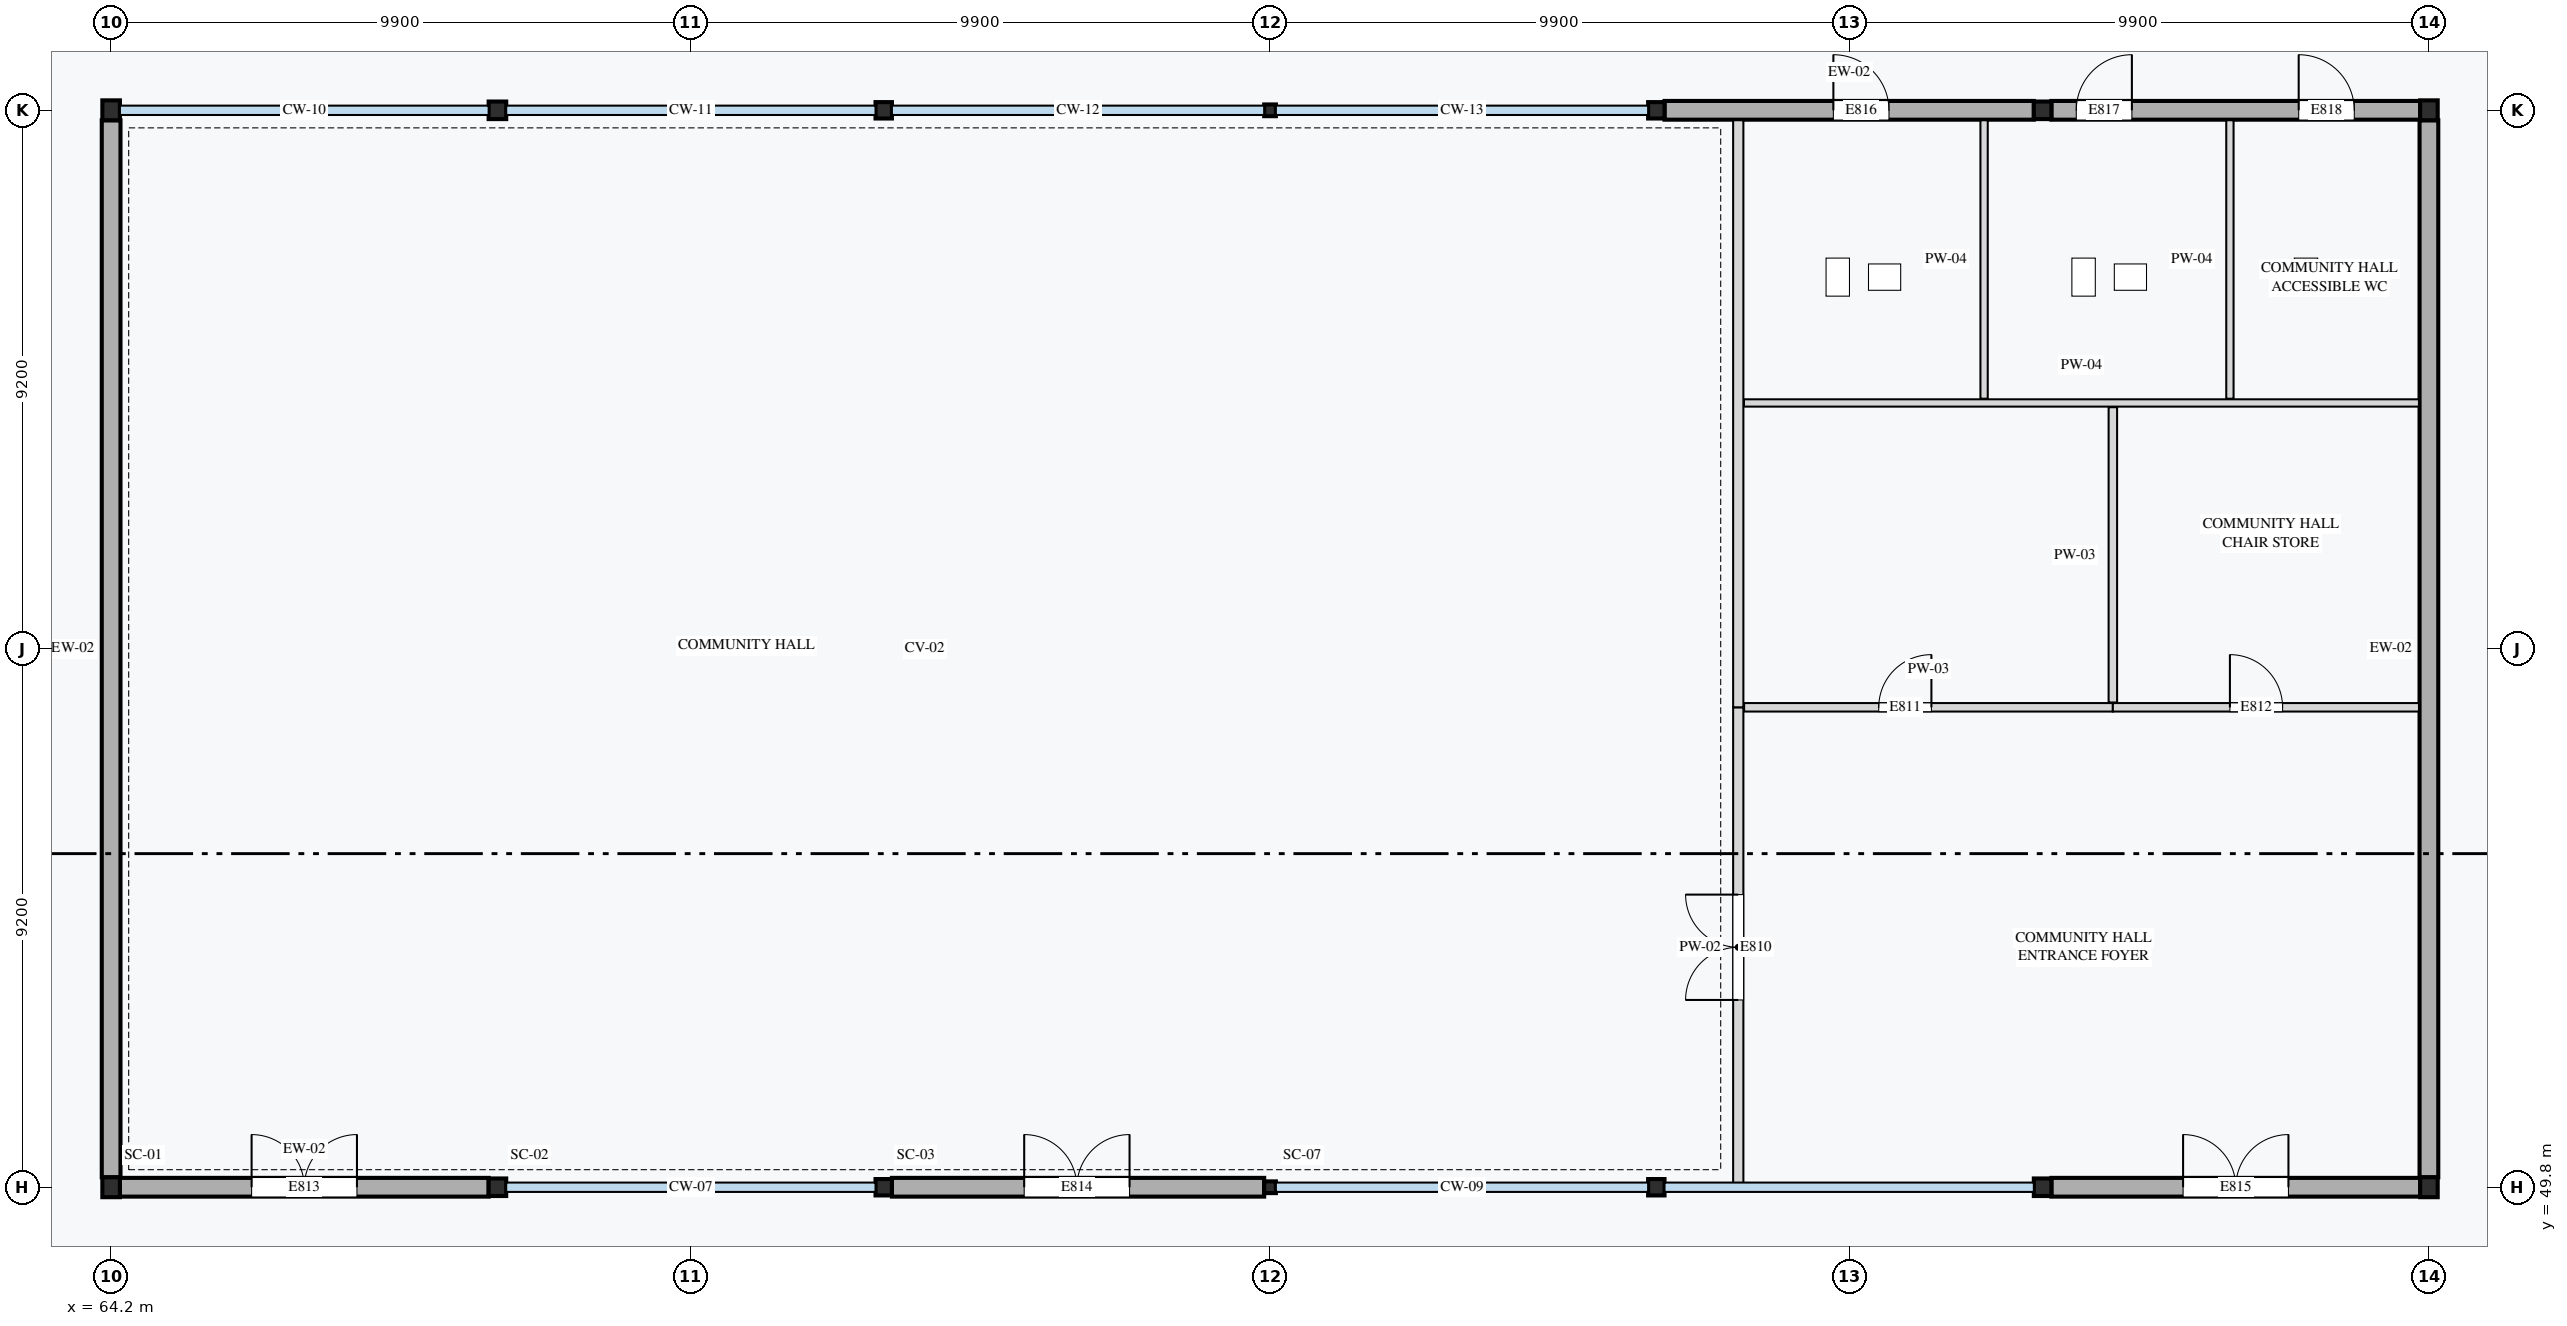
"""IFC4 building model, lengths in metres.
Left out: names, types, materials, properties, quantities, classifications, styles, units other than length and angle.
Written with IfcOpenShell. Run it as: python <this file> out.ifc"""

import sys

from ifc_helpers import new_model, si_unit, direction, frame, frame_2d, origin, origin_2d, place, context, subcontext, project, spatial, rectangle, hollow_rectangle, i_section, extrude, element, fill, save


model = new_model("IFC4")
c1 = context("Model", 3, precision=1e-05, world=origin(), true_north=direction((0.0, 1.0)))
c2 = subcontext(c1, "Body", "Model", "MODEL_VIEW")
j1 = project(units=[si_unit("LENGTHUNIT", "METRE"), si_unit("PLANEANGLEUNIT", "RADIAN")], contexts=[c1])
p1 = place(None, origin())
s1 = spatial("IfcSite", under=j1, at=p1, CompositionType="ELEMENT")
p2 = place(p1, origin())
s2 = spatial("IfcBuilding", under=s1, at=p2, CompositionType="ELEMENT")
p3 = place(p2, frame((0.0, 0.0, 4.2)))
s3 = spatial("IfcBuildingStorey", under=s2, at=p3, CompositionType="ELEMENT", Elevation=4.2)
for number, where, z_axis, x_axis in (
    (1, (64.2, 49.8, 0.0), (0.0, 0.0, 1.0), (1.0, 0.0, 0.0)),
    (2, (64.2, 68.2, 0.0), (0.0, 0.0, 1.0), (1.0, 0.0, 0.0)),
):
    element("IfcColumn", number, at=place(p3, frame(where, z_axis=z_axis, x_axis=x_axis)), inside=s3, PredefinedType="COLUMN", context=c2, shape_type="SweptSolid", body=[
        extrude(i_section(OverallWidth=0.3, OverallDepth=0.34, WebThickness=0.012, FlangeThickness=0.021, FilletRadius=0.027, at=origin_2d()), origin(), (0.0, 0.0, 1.0), 3.96),
    ])
for number, where, z_axis, x_axis in (
    (3, (70.8, 49.8, 0.0), (0.0, 0.0, 1.0), (1.0, 0.0, 0.0)),
    (4, (70.8, 68.2, 0.0), (0.0, 0.0, 1.0), (1.0, 0.0, 0.0)),
):
    element("IfcColumn", number, at=place(p3, frame(where, z_axis=z_axis, x_axis=x_axis)), inside=s3, PredefinedType="COLUMN", context=c2, shape_type="SweptSolid", body=[
        extrude(i_section(OverallWidth=0.3, OverallDepth=0.3, WebThickness=0.011, FlangeThickness=0.019, FilletRadius=0.027, at=origin_2d()), origin(), (0.0, 0.0, 1.0), 3.96),
    ])
for number, where, z_axis, x_axis in (
    (5, (77.4, 49.8, 0.0), (0.0, 0.0, 1.0), (1.0, 0.0, 0.0)),
    (6, (77.4, 68.2, 0.0), (0.0, 0.0, 1.0), (1.0, 0.0, 0.0)),
):
    element("IfcColumn", number, at=place(p3, frame(where, z_axis=z_axis, x_axis=x_axis)), inside=s3, PredefinedType="COLUMN", context=c2, shape_type="SweptSolid", body=[
        extrude(i_section(OverallWidth=0.28, OverallDepth=0.28, WebThickness=0.01, FlangeThickness=0.018, FilletRadius=0.024, at=origin_2d()), origin(), (0.0, 0.0, 1.0), 3.96),
    ])
for number, where, z_axis, x_axis in (
    (7, (84.0, 49.8, 0.0), (0.0, 0.0, 1.0), (1.0, 0.0, 0.0)),
    (8, (84.0, 68.2, 0.0), (0.0, 0.0, 1.0), (1.0, 0.0, 0.0)),
):
    element("IfcColumn", number, at=place(p3, frame(where, z_axis=z_axis, x_axis=x_axis)), inside=s3, PredefinedType="COLUMN", context=c2, shape_type="SweptSolid", body=[
        extrude(hollow_rectangle(XDim=0.2, YDim=0.2, WallThickness=0.01, InnerFilletRadius=0.01, OuterFilletRadius=0.015, at=origin_2d()), origin(), (0.0, 0.0, 1.0), 3.96),
    ])
for number, where, z_axis, x_axis in (
    (9, (90.6, 49.8, 0.0), (0.0, 0.0, 1.0), (1.0, 0.0, 0.0)),
    (10, (90.6, 68.2, 0.0), (0.0, 0.0, 1.0), (1.0, 0.0, 0.0)),
):
    element("IfcColumn", number, at=place(p3, frame(where, z_axis=z_axis, x_axis=x_axis)), inside=s3, PredefinedType="COLUMN", context=c2, shape_type="SweptSolid", body=[
        extrude(i_section(OverallWidth=0.28, OverallDepth=0.28, WebThickness=0.01, FlangeThickness=0.018, FilletRadius=0.024, at=origin_2d()), origin(), (0.0, 0.0, 1.0), 3.96),
    ])
for number, where, z_axis, x_axis in (
    (11, (97.2, 49.8, 0.0), (0.0, 0.0, 1.0), (1.0, 0.0, 0.0)),
    (12, (97.2, 68.2, 0.0), (0.0, 0.0, 1.0), (1.0, 0.0, 0.0)),
):
    element("IfcColumn", number, at=place(p3, frame(where, z_axis=z_axis, x_axis=x_axis)), inside=s3, PredefinedType="COLUMN", context=c2, shape_type="SweptSolid", body=[
        extrude(i_section(OverallWidth=0.3, OverallDepth=0.3, WebThickness=0.011, FlangeThickness=0.019, FilletRadius=0.027, at=origin_2d()), origin(), (0.0, 0.0, 1.0), 3.96),
    ])
for number, where, z_axis, x_axis in (
    (13, (103.8, 49.8, 0.0), (0.0, 0.0, 1.0), (1.0, 0.0, 0.0)),
    (14, (103.8, 68.2, 0.0), (0.0, 0.0, 1.0), (1.0, 0.0, 0.0)),
):
    element("IfcColumn", number, at=place(p3, frame(where, z_axis=z_axis, x_axis=x_axis)), inside=s3, PredefinedType="COLUMN", context=c2, shape_type="SweptSolid", body=[
        extrude(i_section(OverallWidth=0.3, OverallDepth=0.34, WebThickness=0.012, FlangeThickness=0.021, FilletRadius=0.027, at=origin_2d()), origin(), (0.0, 0.0, 1.0), 3.96),
    ])
p4 = place(p3, frame((64.35, 49.8, 0.0), z_axis=(0.0, 0.0, 1.0), x_axis=(1.0, 0.0, 0.0)))
e15 = element("IfcWall", 15, at=p4, inside=s3, PredefinedType="STANDARD", context=c2, shape_type="SweptSolid", body=[
    extrude(rectangle(XDim=6.3, YDim=0.32, at=frame_2d((3.15, 0.0))), origin(), (0.0, 0.0, 1.0), 3.55),
])
p5 = place(p4, frame((2.25, 0.0, 0.0)))
e16 = element("IfcOpeningElement", 16, at=p5, cuts=e15, PredefinedType="OPENING", context=c2, shape_type="SweptSolid", body=[
    extrude(rectangle(XDim=1.8, YDim=2.4, at=frame_2d((0.9, 1.2))), frame((0.0, 0.17, 0.0), z_axis=(0.0, -1.0, 0.0), x_axis=(1.0, 0.0, 0.0)), (0.0, 0.0, 1.0), 0.34),
])
p6 = place(p3, frame((77.54, 49.8, 0.0), z_axis=(0.0, 0.0, 1.0), x_axis=(1.0, 0.0, 0.0)))
e17 = element("IfcWall", 17, at=p6, inside=s3, PredefinedType="STANDARD", context=c2, shape_type="SweptSolid", body=[
    extrude(rectangle(XDim=6.36, YDim=0.32, at=frame_2d((3.18, 0.0))), origin(), (0.0, 0.0, 1.0), 3.55),
])
p7 = place(p6, frame((2.26, 0.0, 0.0)))
e18 = element("IfcOpeningElement", 18, at=p7, cuts=e17, PredefinedType="OPENING", context=c2, shape_type="SweptSolid", body=[
    extrude(rectangle(XDim=1.8, YDim=2.4, at=frame_2d((0.9, 1.2))), frame((0.0, 0.17, 0.0), z_axis=(0.0, -1.0, 0.0), x_axis=(1.0, 0.0, 0.0)), (0.0, 0.0, 1.0), 0.34),
])
p8 = place(p3, frame((90.74, 68.2, 0.0), z_axis=(0.0, 0.0, 1.0), x_axis=(1.0, 0.0, 0.0)))
e19 = element("IfcWall", 19, at=p8, inside=s3, PredefinedType="STANDARD", context=c2, shape_type="SweptSolid", body=[
    extrude(rectangle(XDim=6.31, YDim=0.32, at=frame_2d((3.155, 0.0))), origin(), (0.0, 0.0, 1.0), 3.55),
])
p9 = place(p8, frame((2.885, 0.0, 0.0)))
e20 = element("IfcOpeningElement", 20, at=p9, cuts=e19, PredefinedType="OPENING", context=c2, shape_type="SweptSolid", body=[
    extrude(rectangle(XDim=0.95, YDim=2.3, at=frame_2d((0.475, 1.15))), frame((0.0, 0.17, 0.0), z_axis=(0.0, -1.0, 0.0), x_axis=(1.0, 0.0, 0.0)), (0.0, 0.0, 1.0), 0.34),
])
p10 = place(p3, frame((97.35, 49.8, 0.0), z_axis=(0.0, 0.0, 1.0), x_axis=(1.0, 0.0, 0.0)))
e21 = element("IfcWall", 21, at=p10, inside=s3, PredefinedType="STANDARD", context=c2, shape_type="SweptSolid", body=[
    extrude(rectangle(XDim=6.3, YDim=0.32, at=frame_2d((3.15, 0.0))), origin(), (0.0, 0.0, 1.0), 3.55),
])
p11 = place(p10, frame((2.25, 0.0, 0.0)))
e22 = element("IfcOpeningElement", 22, at=p11, cuts=e21, PredefinedType="OPENING", context=c2, shape_type="SweptSolid", body=[
    extrude(rectangle(XDim=1.8, YDim=2.4, at=frame_2d((0.9, 1.2))), frame((0.0, 0.17, 0.0), z_axis=(0.0, -1.0, 0.0), x_axis=(1.0, 0.0, 0.0)), (0.0, 0.0, 1.0), 0.34),
])
p12 = place(p3, frame((97.35, 68.2, 0.0), z_axis=(0.0, 0.0, 1.0), x_axis=(1.0, 0.0, 0.0)))
e23 = element("IfcWall", 23, at=p12, inside=s3, PredefinedType="STANDARD", context=c2, shape_type="SweptSolid", body=[
    extrude(rectangle(XDim=6.3, YDim=0.32, at=frame_2d((3.15, 0.0))), origin(), (0.0, 0.0, 1.0), 3.55),
])
p13 = place(p12, frame((0.425, 0.0, 0.0)))
e24 = element("IfcOpeningElement", 24, at=p13, cuts=e23, PredefinedType="OPENING", context=c2, shape_type="SweptSolid", body=[
    extrude(rectangle(XDim=0.95, YDim=2.3, at=frame_2d((0.475, 1.15))), frame((0.0, 0.17, 0.0), z_axis=(0.0, -1.0, 0.0), x_axis=(1.0, 0.0, 0.0)), (0.0, 0.0, 1.0), 0.34),
])
p14 = place(p12, frame((4.225, 0.0, 0.0)))
e25 = element("IfcOpeningElement", 25, at=p14, cuts=e23, PredefinedType="OPENING", context=c2, shape_type="SweptSolid", body=[
    extrude(rectangle(XDim=0.95, YDim=2.3, at=frame_2d((0.475, 1.15))), frame((0.0, 0.17, 0.0), z_axis=(0.0, -1.0, 0.0), x_axis=(1.0, 0.0, 0.0)), (0.0, 0.0, 1.0), 0.34),
])
for number, where, z_axis, x_axis in (
    (26, (64.2, 49.97, 0.0), (0.0, 0.0, 1.0), (0.0, 1.0, 0.0)),
    (27, (103.8, 49.97, 0.0), (0.0, 0.0, 1.0), (0.0, 1.0, 0.0)),
):
    element("IfcWall", number, at=place(p3, frame(where, z_axis=z_axis, x_axis=x_axis)), inside=s3, PredefinedType="STANDARD", context=c2, shape_type="SweptSolid", body=[
        extrude(rectangle(XDim=18.06, YDim=0.32, at=frame_2d((9.03, 0.0))), origin(), (0.0, 0.0, 1.0), 2.6),
    ])
p15 = place(p3, frame((92.0, 49.8, 0.0), z_axis=(0.0, 0.0, 1.0), x_axis=(0.0, 1.0, 0.0)))
e28 = element("IfcWall", 28, at=p15, inside=s3, PredefinedType="PARTITIONING", context=c2, shape_type="SweptSolid", body=[
    extrude(rectangle(XDim=8.2, YDim=0.175, at=frame_2d((4.1, 0.0))), origin(), (0.0, 0.0, 1.0), 2.6),
])
p16 = place(p15, frame((3.2, 0.0, 0.0)))
e29 = element("IfcOpeningElement", 29, at=p16, cuts=e28, PredefinedType="OPENING", context=c2, shape_type="SweptSolid", body=[
    extrude(rectangle(XDim=1.8, YDim=2.26, at=frame_2d((0.9, 1.13))), frame((0.0, 0.097, 0.0), z_axis=(0.0, -1.0, 0.0), x_axis=(1.0, 0.0, 0.0)), (0.0, 0.0, 1.0), 0.195),
])
p17 = place(p3, frame((92.0, 58.0, 0.0), z_axis=(0.0, 0.0, 1.0), x_axis=(0.0, 1.0, 0.0)))
e30 = element("IfcWall", 30, at=p17, inside=s3, PredefinedType="PARTITIONING", context=c2, shape_type="SweptSolid", body=[
    extrude(rectangle(XDim=10.03, YDim=0.175, at=frame_2d((5.015, 0.0))), origin(), (0.0, 0.0, 1.0), 2.6),
])
p18 = place(p3, frame((92.1, 58.0, 0.0), z_axis=(0.0, 0.0, 1.0), x_axis=(1.0, 0.0, 0.0)))
e31 = element("IfcWall", 31, at=p18, inside=s3, PredefinedType="PARTITIONING", context=c2, shape_type="SweptSolid", body=[
    extrude(rectangle(XDim=6.3, YDim=0.145, at=frame_2d((3.15, 0.0))), origin(), (0.0, 0.0, 1.0), 2.6),
])
p19 = place(p18, frame((2.3, 0.0, 0.0)))
e32 = element("IfcOpeningElement", 32, at=p19, cuts=e31, PredefinedType="OPENING", context=c2, shape_type="SweptSolid", body=[
    extrude(rectangle(XDim=0.9, YDim=2.1, at=frame_2d((0.45, 1.05))), frame((0.0, 0.083, 0.0), z_axis=(0.0, -1.0, 0.0), x_axis=(1.0, 0.0, 0.0)), (0.0, 0.0, 1.0), 0.165),
])
p20 = place(p3, frame((98.4, 58.0, 0.0), z_axis=(0.0, 0.0, 1.0), x_axis=(1.0, 0.0, 0.0)))
e33 = element("IfcWall", 33, at=p20, inside=s3, PredefinedType="PARTITIONING", context=c2, shape_type="SweptSolid", body=[
    extrude(rectangle(XDim=5.23, YDim=0.145, at=frame_2d((2.615, 0.0))), origin(), (0.0, 0.0, 1.0), 2.6),
])
p21 = place(p20, frame((2.0, 0.0, 0.0)))
e34 = element("IfcOpeningElement", 34, at=p21, cuts=e33, PredefinedType="OPENING", context=c2, shape_type="SweptSolid", body=[
    extrude(rectangle(XDim=0.9, YDim=2.16, at=frame_2d((0.45, 1.08))), frame((0.0, 0.083, 0.0), z_axis=(0.0, -1.0, 0.0), x_axis=(1.0, 0.0, 0.0)), (0.0, 0.0, 1.0), 0.165),
])
p22 = place(p3, frame((92.097, 63.2, 0.0), z_axis=(0.0, 0.0, 1.0), x_axis=(1.0, 0.0, 0.0)))
e35 = element("IfcWall", 35, at=p22, inside=s3, PredefinedType="PARTITIONING", context=c2, shape_type="SweptSolid", body=[
    extrude(rectangle(XDim=11.532, YDim=0.125, at=frame_2d((5.766, 0.0))), origin(), (0.0, 0.0, 1.0), 2.6),
])
p23 = place(p3, frame((98.4, 58.083, 0.0), z_axis=(0.0, 0.0, 1.0), x_axis=(0.0, 1.0, 0.0)))
e36 = element("IfcWall", 36, at=p23, inside=s3, PredefinedType="PARTITIONING", context=c2, shape_type="SweptSolid", body=[
    extrude(rectangle(XDim=5.045, YDim=0.145, at=frame_2d((2.522, 0.0))), origin(), (0.0, 0.0, 1.0), 2.6),
])
for number, where, z_axis, x_axis in (
    (37, (96.2, 63.272, 0.0), (0.0, 0.0, 1.0), (0.0, 1.0, 0.0)),
    (38, (100.4, 63.272, 0.0), (0.0, 0.0, 1.0), (0.0, 1.0, 0.0)),
):
    element("IfcWall", number, at=place(p3, frame(where, z_axis=z_axis, x_axis=x_axis)), inside=s3, PredefinedType="PARTITIONING", context=c2, shape_type="SweptSolid", body=[
        extrude(rectangle(XDim=4.758, YDim=0.125, at=frame_2d((2.379, 0.0))), origin(), (0.0, 0.0, 1.0), 2.6),
    ])
p24 = place(p5, origin())
e39 = element("IfcDoor", 39, at=p24, inside=s3, OperationType="DOUBLE_DOOR_SINGLE_SWING", PredefinedType="DOOR", context=c2, shape_type="SweptSolid", body=[
    extrude(rectangle(XDim=1.8, YDim=2.4, at=frame_2d((0.9, 1.2))), frame((0.0, 0.025, 0.0), z_axis=(0.0, -1.0, 0.0), x_axis=(1.0, 0.0, 0.0)), (0.0, 0.0, 1.0), 0.05),
])
fill(e16, e39)
p25 = place(p7, origin())
e40 = element("IfcDoor", 40, at=p25, inside=s3, OperationType="DOUBLE_DOOR_SINGLE_SWING", PredefinedType="DOOR", context=c2, shape_type="SweptSolid", body=[
    extrude(rectangle(XDim=1.8, YDim=2.4, at=frame_2d((0.9, 1.2))), frame((0.0, 0.025, 0.0), z_axis=(0.0, -1.0, 0.0), x_axis=(1.0, 0.0, 0.0)), (0.0, 0.0, 1.0), 0.05),
])
fill(e18, e40)
p26 = place(p11, origin())
e41 = element("IfcDoor", 41, at=p26, inside=s3, OperationType="DOUBLE_DOOR_SINGLE_SWING", PredefinedType="DOOR", context=c2, shape_type="SweptSolid", body=[
    extrude(rectangle(XDim=1.8, YDim=2.4, at=frame_2d((0.9, 1.2))), frame((0.0, 0.025, 0.0), z_axis=(0.0, -1.0, 0.0), x_axis=(1.0, 0.0, 0.0)), (0.0, 0.0, 1.0), 0.05),
])
fill(e22, e41)
p27 = place(p9, origin())
e42 = element("IfcDoor", 42, at=p27, inside=s3, OperationType="SINGLE_SWING_LEFT", PredefinedType="DOOR", context=c2, shape_type="SweptSolid", body=[
    extrude(rectangle(XDim=0.95, YDim=2.3, at=frame_2d((0.475, 1.15))), frame((0.0, 0.025, 0.0), z_axis=(0.0, -1.0, 0.0), x_axis=(1.0, 0.0, 0.0)), (0.0, 0.0, 1.0), 0.05),
])
fill(e20, e42)
p28 = place(p13, origin())
e43 = element("IfcDoor", 43, at=p28, inside=s3, OperationType="SINGLE_SWING_RIGHT", PredefinedType="DOOR", context=c2, shape_type="SweptSolid", body=[
    extrude(rectangle(XDim=0.95, YDim=2.3, at=frame_2d((0.475, 1.15))), frame((0.0, 0.025, 0.0), z_axis=(0.0, -1.0, 0.0), x_axis=(1.0, 0.0, 0.0)), (0.0, 0.0, 1.0), 0.05),
])
fill(e24, e43)
p29 = place(p14, origin())
e44 = element("IfcDoor", 44, at=p29, inside=s3, OperationType="SINGLE_SWING_LEFT", PredefinedType="DOOR", context=c2, shape_type="SweptSolid", body=[
    extrude(rectangle(XDim=0.95, YDim=2.3, at=frame_2d((0.475, 1.15))), frame((0.0, 0.025, 0.0), z_axis=(0.0, -1.0, 0.0), x_axis=(1.0, 0.0, 0.0)), (0.0, 0.0, 1.0), 0.05),
])
fill(e25, e44)
p30 = place(p16, origin())
e45 = element("IfcDoor", 45, at=p30, inside=s3, OperationType="DOUBLE_DOOR_SINGLE_SWING", PredefinedType="DOOR", context=c2, shape_type="SweptSolid", body=[
    extrude(rectangle(XDim=1.8, YDim=2.26, at=frame_2d((0.9, 1.13))), frame((0.0, 0.025, 0.0), z_axis=(0.0, -1.0, 0.0), x_axis=(1.0, 0.0, 0.0)), (0.0, 0.0, 1.0), 0.05),
])
fill(e29, e45)
p31 = place(p19, origin())
e46 = element("IfcDoor", 46, at=p31, inside=s3, OperationType="SINGLE_SWING_RIGHT", PredefinedType="DOOR", context=c2, shape_type="SweptSolid", body=[
    extrude(rectangle(XDim=0.9, YDim=2.1, at=frame_2d((0.45, 1.05))), frame((0.0, 0.025, 0.0), z_axis=(0.0, -1.0, 0.0), x_axis=(1.0, 0.0, 0.0)), (0.0, 0.0, 1.0), 0.05),
])
fill(e32, e46)
p32 = place(p21, origin())
e47 = element("IfcDoor", 47, at=p32, inside=s3, OperationType="SINGLE_SWING_LEFT", PredefinedType="DOOR", context=c2, shape_type="SweptSolid", body=[
    extrude(rectangle(XDim=0.9, YDim=2.16, at=frame_2d((0.45, 1.08))), frame((0.0, 0.025, 0.0), z_axis=(0.0, -1.0, 0.0), x_axis=(1.0, 0.0, 0.0)), (0.0, 0.0, 1.0), 0.05),
])
fill(e34, e47)
save(model, sys.argv[1])
